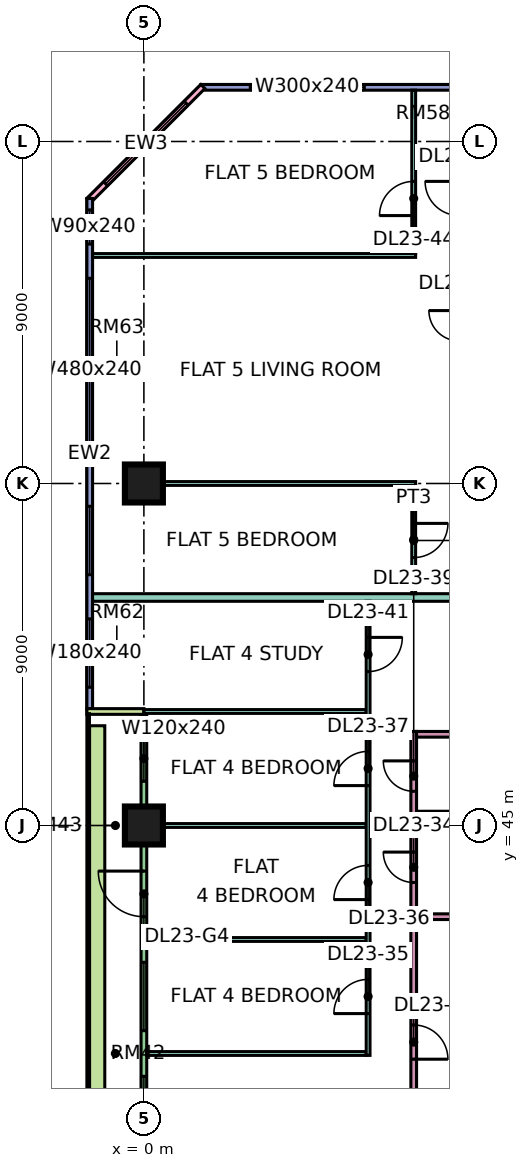
"""IFC4 building model, lengths in metres.
Left out: names, types, materials, properties, quantities, classifications, styles, units other than length and angle.
Written with IfcOpenShell. Run it as: python <this file> out.ifc"""

import sys

from ifc_helpers import new_model, si_unit, direction, frame, frame_2d, origin, origin_2d, place, context, subcontext, project, spatial, rectangle, extrude, element, fill, save


model = new_model("IFC4")
c1 = context("Model", 3, precision=1e-05, world=origin(), true_north=direction((0.0, 1.0)))
c2 = subcontext(c1, "Body", "Model", "MODEL_VIEW")
j1 = project(units=[si_unit("LENGTHUNIT", "METRE"), si_unit("PLANEANGLEUNIT", "RADIAN")], contexts=[c1])
p1 = place(None, origin())
s1 = spatial("IfcSite", under=j1, at=p1, CompositionType="ELEMENT")
p2 = place(p1, origin())
s2 = spatial("IfcBuilding", under=s1, at=p2, CompositionType="ELEMENT")
p3 = place(p2, frame((0.0, 0.0, 103.15)))
s3 = spatial("IfcBuildingStorey", under=s2, at=p3, CompositionType="ELEMENT", Elevation=103.15)
p4 = place(p3, frame((0.0, 45.0, 0.0), z_axis=(0.0, 0.0, 1.0), x_axis=(1.0, 0.0, 0.0)))
e1 = element("IfcColumn", 1, at=p4, inside=s3, PredefinedType="COLUMN", context=c2, shape_type="SweptSolid", body=[
    extrude(rectangle(XDim=1.0, YDim=1.0, at=origin_2d()), origin(), (0.0, 0.0, 1.0), 3.75),
])
p5 = place(p3, frame((0.0, 54.0, 0.0), z_axis=(0.0, 0.0, 1.0), x_axis=(1.0, 0.0, 0.0)))
e2 = element("IfcColumn", 2, at=p5, inside=s3, PredefinedType="COLUMN", context=c2, shape_type="SweptSolid", body=[
    extrude(rectangle(XDim=1.0, YDim=1.0, at=origin_2d()), origin(), (0.0, 0.0, 1.0), 3.75),
])
p6 = place(p3, frame((11.925, 64.425, 0.0), z_axis=(0.0, 0.0, 1.0), x_axis=(-1.0, 0.0, 0.0)))
e3 = element("IfcWall", 3, at=p6, inside=s3, PredefinedType="SOLIDWALL", context=c2, shape_type="SweptSolid", body=[
    extrude(rectangle(XDim=10.425, YDim=0.15, at=frame_2d((5.212, 0.0))), origin(), (0.0, 0.0, 1.0), 3.35),
])
p7 = place(p6, frame((0.613, 0.0, 0.45)))
e4 = element("IfcOpeningElement", 4, at=p7, cuts=e3, PredefinedType="OPENING", context=c2, shape_type="SweptSolid", body=[
    extrude(rectangle(XDim=2.4, YDim=2.4, at=frame_2d((1.2, 1.2))), frame((0.0, 0.085, 0.0), z_axis=(0.0, -1.0, 0.0), x_axis=(1.0, 0.0, 0.0)), (0.0, 0.0, 1.0), 0.17),
])
p8 = place(p6, frame((6.125, 0.0, 0.45)))
e5 = element("IfcOpeningElement", 5, at=p8, cuts=e3, PredefinedType="OPENING", context=c2, shape_type="SweptSolid", body=[
    extrude(rectangle(XDim=3.0, YDim=2.4, at=frame_2d((1.5, 1.2))), frame((0.0, 0.085, 0.0), z_axis=(0.0, -1.0, 0.0), x_axis=(1.0, 0.0, 0.0)), (0.0, 0.0, 1.0), 0.17),
])
p9 = place(p3, frame((1.553, 64.447, 0.0), z_axis=(0.0, 0.0, 1.0), x_axis=(-0.707106781187, -0.707106781187, 0.0)))
e6 = element("IfcWall", 6, at=p9, inside=s3, PredefinedType="SOLIDWALL", context=c2, shape_type="SweptSolid", body=[
    extrude(rectangle(XDim=4.243, YDim=0.15, at=frame_2d((2.121, 0.0))), origin(), (0.0, 0.0, 1.0), 3.35),
])
p10 = place(p9, frame((0.621, 0.0, 0.45)))
e7 = element("IfcOpeningElement", 7, at=p10, cuts=e6, PredefinedType="OPENING", context=c2, shape_type="SweptSolid", body=[
    extrude(rectangle(XDim=3.0, YDim=2.4, at=frame_2d((1.5, 1.2))), frame((0.0, 0.085, 0.0), z_axis=(0.0, -1.0, 0.0), x_axis=(1.0, 0.0, 0.0)), (0.0, 0.0, 1.0), 0.17),
])
p11 = place(p3, frame((-1.425, 61.5, 0.0), z_axis=(0.0, 0.0, 1.0), x_axis=(0.0, -1.0, 0.0)))
e8 = element("IfcWall", 8, at=p11, inside=s3, PredefinedType="SOLIDWALL", context=c2, shape_type="SweptSolid", body=[
    extrude(rectangle(XDim=13.425, YDim=0.15, at=frame_2d((6.712, 0.0))), origin(), (0.0, 0.0, 1.0), 3.35),
])
p12 = place(p11, frame((0.3, 0.0, 0.45)))
e9 = element("IfcOpeningElement", 9, at=p12, cuts=e8, PredefinedType="OPENING", context=c2, shape_type="SweptSolid", body=[
    extrude(rectangle(XDim=0.9, YDim=2.4, at=frame_2d((0.45, 1.2))), frame((0.0, 0.085, 0.0), z_axis=(0.0, -1.0, 0.0), x_axis=(1.0, 0.0, 0.0)), (0.0, 0.0, 1.0), 0.17),
])
p13 = place(p11, frame((2.1, 0.0, 0.45)))
e10 = element("IfcOpeningElement", 10, at=p13, cuts=e8, PredefinedType="OPENING", context=c2, shape_type="SweptSolid", body=[
    extrude(rectangle(XDim=4.8, YDim=2.4, at=frame_2d((2.4, 1.2))), frame((0.0, 0.085, 0.0), z_axis=(0.0, -1.0, 0.0), x_axis=(1.0, 0.0, 0.0)), (0.0, 0.0, 1.0), 0.17),
])
p14 = place(p11, frame((8.1, 0.0, 0.45)))
e11 = element("IfcOpeningElement", 11, at=p14, cuts=e8, PredefinedType="OPENING", context=c2, shape_type="SweptSolid", body=[
    extrude(rectangle(XDim=1.8, YDim=2.4, at=frame_2d((0.9, 1.2))), frame((0.0, 0.085, 0.0), z_axis=(0.0, -1.0, 0.0), x_axis=(1.0, 0.0, 0.0)), (0.0, 0.0, 1.0), 0.17),
])
p15 = place(p11, frame((11.062, 0.0, 0.45)))
e12 = element("IfcOpeningElement", 12, at=p15, cuts=e8, PredefinedType="OPENING", context=c2, shape_type="SweptSolid", body=[
    extrude(rectangle(XDim=1.8, YDim=2.4, at=frame_2d((0.9, 1.2))), frame((0.0, 0.085, 0.0), z_axis=(0.0, -1.0, 0.0), x_axis=(1.0, 0.0, 0.0)), (0.0, 0.0, 1.0), 0.17),
])
p16 = place(p3, frame((0.0, 47.925, 0.0), z_axis=(0.0, 0.0, 1.0), x_axis=(0.0, -1.0, 0.0)))
e13 = element("IfcWall", 13, at=p16, inside=s3, PredefinedType="SOLIDWALL", context=c2, shape_type="SweptSolid", body=[
    extrude(rectangle(XDim=11.85, YDim=0.15, at=frame_2d((5.925, 0.0))), origin(), (0.0, 0.0, 1.0), 3.35),
])
p17 = place(p16, frame((0.562, 0.0, 0.45)))
e14 = element("IfcOpeningElement", 14, at=p17, cuts=e13, PredefinedType="OPENING", context=c2, shape_type="SweptSolid", body=[
    extrude(rectangle(XDim=1.2, YDim=2.4, at=frame_2d((0.6, 1.2))), frame((0.0, 0.085, 0.0), z_axis=(0.0, -1.0, 0.0), x_axis=(1.0, 0.0, 0.0)), (0.0, 0.0, 1.0), 0.17),
])
p18 = place(p16, frame((4.125, 0.0, 0.0)))
e15 = element("IfcOpeningElement", 15, at=p18, cuts=e13, PredefinedType="OPENING", context=c2, shape_type="SweptSolid", body=[
    extrude(rectangle(XDim=1.2, YDim=2.4, at=frame_2d((0.6, 1.2))), frame((0.0, 0.085, 0.0), z_axis=(0.0, -1.0, 0.0), x_axis=(1.0, 0.0, 0.0)), (0.0, 0.0, 1.0), 0.17),
])
p19 = place(p16, frame((6.525, 0.0, 0.45)))
e16 = element("IfcOpeningElement", 16, at=p19, cuts=e13, PredefinedType="OPENING", context=c2, shape_type="SweptSolid", body=[
    extrude(rectangle(XDim=1.8, YDim=2.4, at=frame_2d((0.9, 1.2))), frame((0.0, 0.085, 0.0), z_axis=(0.0, -1.0, 0.0), x_axis=(1.0, 0.0, 0.0)), (0.0, 0.0, 1.0), 0.17),
])
p20 = place(p16, frame((9.525, 0.0, 0.45)))
e17 = element("IfcOpeningElement", 17, at=p20, cuts=e13, PredefinedType="OPENING", context=c2, shape_type="SweptSolid", body=[
    extrude(rectangle(XDim=1.2, YDim=2.4, at=frame_2d((0.6, 1.2))), frame((0.0, 0.085, 0.0), z_axis=(0.0, -1.0, 0.0), x_axis=(1.0, 0.0, 0.0)), (0.0, 0.0, 1.0), 0.17),
])
p21 = place(p3, frame((-1.5, 48.0, 0.0), z_axis=(0.0, 0.0, 1.0), x_axis=(1.0, 0.0, 0.0)))
e18 = element("IfcWall", 18, at=p21, inside=s3, PredefinedType="SOLIDWALL", context=c2, shape_type="SweptSolid", body=[
    extrude(rectangle(XDim=1.5, YDim=0.15, at=frame_2d((0.75, 0.0))), origin(), (0.0, 0.0, 1.0), 3.35),
])
p22 = place(p3, frame((-1.229, 47.625, 0.0), z_axis=(0.0, 0.0, 1.0), x_axis=(0.0, -1.0, 0.0)))
e19 = element("IfcWall", 19, at=p22, inside=s3, PredefinedType="SOLIDWALL", context=c2, shape_type="SweptSolid", body=[
    extrude(rectangle(XDim=11.25, YDim=0.4, at=frame_2d((5.625, 0.0))), origin(), (0.0, 0.0, 1.0), 0.7),
])
p23 = place(p3, frame((0.0, 48.0, 0.0), z_axis=(0.0, 0.0, 1.0), x_axis=(1.0, 0.0, 0.0)))
e20 = element("IfcWall", 20, at=p23, inside=s3, PredefinedType="PARTITIONING", context=c2, shape_type="SweptSolid", body=[
    extrude(rectangle(XDim=5.85, YDim=0.1, at=frame_2d((2.925, 0.0))), origin(), (0.0, 0.0, 1.0), 3.35),
])
p24 = place(p3, frame((-1.35, 51.0, 0.0), z_axis=(0.0, 0.0, 1.0), x_axis=(1.0, 0.0, 0.0)))
e21 = element("IfcWall", 21, at=p24, inside=s3, PredefinedType="PARTITIONING", context=c2, shape_type="SweptSolid", body=[
    extrude(rectangle(XDim=13.75, YDim=0.2, at=frame_2d((6.875, 0.0))), origin(), (0.0, 0.0, 1.0), 3.35),
])
e22 = element("IfcWall", 22, at=p5, inside=s3, PredefinedType="PARTITIONING", context=c2, shape_type="SweptSolid", body=[
    extrude(rectangle(XDim=7.15, YDim=0.1, at=frame_2d((3.575, 0.0))), origin(), (0.0, 0.0, 1.0), 3.35),
])
p25 = place(p3, frame((-1.35, 60.0, 0.0), z_axis=(0.0, 0.0, 1.0), x_axis=(1.0, 0.0, 0.0)))
e23 = element("IfcWall", 23, at=p25, inside=s3, PredefinedType="PARTITIONING", context=c2, shape_type="SweptSolid", body=[
    extrude(rectangle(XDim=8.5, YDim=0.1, at=frame_2d((4.25, 0.0))), origin(), (0.0, 0.0, 1.0), 3.35),
])
for number, where, z_axis, x_axis in (
    (24, (0.074, 39.0, 0.0), (0.0, 0.0, 1.0), (1.0, 0.0, 0.0)),
    (25, (0.074, 42.0, 0.0), (0.0, 0.0, 1.0), (1.0, 0.0, 0.0)),
    (26, (0.074, 45.0, 0.0), (0.0, 0.0, 1.0), (1.0, 0.0, 0.0)),
):
    element("IfcWall", number, at=place(p3, frame(where, z_axis=z_axis, x_axis=x_axis)), inside=s3, PredefinedType="PARTITIONING", context=c2, shape_type="SweptSolid", body=[
        extrude(rectangle(XDim=5.776, YDim=0.1, at=frame_2d((2.888, 0.0))), origin(), (0.0, 0.0, 1.0), 3.35),
    ])
p26 = place(p3, frame((5.9, 38.95, 0.0), z_axis=(0.0, 0.0, 1.0), x_axis=(0.0, 1.0, 0.0)))
e27 = element("IfcWall", 27, at=p26, inside=s3, PredefinedType="PARTITIONING", context=c2, shape_type="SweptSolid", body=[
    extrude(rectangle(XDim=11.95, YDim=0.1, at=frame_2d((5.975, 0.0))), origin(), (0.0, 0.0, 1.0), 3.35),
])
p27 = place(p26, frame((1.1, 0.0, 0.0)))
e28 = element("IfcOpeningElement", 28, at=p27, cuts=e27, PredefinedType="OPENING", context=c2, shape_type="SweptSolid", body=[
    extrude(rectangle(XDim=0.9, YDim=2.1, at=frame_2d((0.45, 1.05))), frame((0.0, 0.06, 0.0), z_axis=(0.0, -1.0, 0.0), x_axis=(1.0, 0.0, 0.0)), (0.0, 0.0, 1.0), 0.12),
])
p28 = place(p26, frame((4.1, 0.0, 0.0)))
e29 = element("IfcOpeningElement", 29, at=p28, cuts=e27, PredefinedType="OPENING", context=c2, shape_type="SweptSolid", body=[
    extrude(rectangle(XDim=0.9, YDim=2.1, at=frame_2d((0.45, 1.05))), frame((0.0, 0.06, 0.0), z_axis=(0.0, -1.0, 0.0), x_axis=(1.0, 0.0, 0.0)), (0.0, 0.0, 1.0), 0.12),
])
p29 = place(p26, frame((7.1, 0.0, 0.0)))
e30 = element("IfcOpeningElement", 30, at=p29, cuts=e27, PredefinedType="OPENING", context=c2, shape_type="SweptSolid", body=[
    extrude(rectangle(XDim=0.9, YDim=2.1, at=frame_2d((0.45, 1.05))), frame((0.0, 0.06, 0.0), z_axis=(0.0, -1.0, 0.0), x_axis=(1.0, 0.0, 0.0)), (0.0, 0.0, 1.0), 0.12),
])
p30 = place(p26, frame((10.1, 0.0, 0.0)))
e31 = element("IfcOpeningElement", 31, at=p30, cuts=e27, PredefinedType="OPENING", context=c2, shape_type="SweptSolid", body=[
    extrude(rectangle(XDim=0.9, YDim=2.1, at=frame_2d((0.45, 1.05))), frame((0.0, 0.06, 0.0), z_axis=(0.0, -1.0, 0.0), x_axis=(1.0, 0.0, 0.0)), (0.0, 0.0, 1.0), 0.12),
])
p31 = place(p3, frame((7.1, 36.1, 0.0), z_axis=(0.0, 0.0, 1.0), x_axis=(0.0, 1.0, 0.0)))
e32 = element("IfcWall", 32, at=p31, inside=s3, PredefinedType="PARTITIONING", context=c2, shape_type="SweptSolid", body=[
    extrude(rectangle(XDim=11.375, YDim=0.15, at=frame_2d((5.688, 0.0))), origin(), (0.0, 0.0, 1.0), 3.35),
])
p32 = place(p31, frame((7.4, 0.0, 0.0)))
e33 = element("IfcOpeningElement", 33, at=p32, cuts=e32, PredefinedType="OPENING", context=c2, shape_type="SweptSolid", body=[
    extrude(rectangle(XDim=0.8, YDim=2.1, at=frame_2d((0.4, 1.05))), frame((0.0, 0.085, 0.0), z_axis=(0.0, -1.0, 0.0), x_axis=(1.0, 0.0, 0.0)), (0.0, 0.0, 1.0), 0.17),
])
p33 = place(p31, frame((2.75, 0.0, 0.0)))
e34 = element("IfcOpeningElement", 34, at=p33, cuts=e32, PredefinedType="OPENING", context=c2, shape_type="SweptSolid", body=[
    extrude(rectangle(XDim=0.9, YDim=2.1, at=frame_2d((0.45, 1.05))), frame((0.0, 0.085, 0.0), z_axis=(0.0, -1.0, 0.0), x_axis=(1.0, 0.0, 0.0)), (0.0, 0.0, 1.0), 0.17),
])
p34 = place(p31, frame((9.8, 0.0, 0.0)))
e35 = element("IfcOpeningElement", 35, at=p34, cuts=e32, PredefinedType="OPENING", context=c2, shape_type="SweptSolid", body=[
    extrude(rectangle(XDim=0.8, YDim=2.1, at=frame_2d((0.4, 1.05))), frame((0.0, 0.085, 0.0), z_axis=(0.0, -1.0, 0.0), x_axis=(1.0, 0.0, 0.0)), (0.0, 0.0, 1.0), 0.17),
])
p35 = place(p3, frame((7.1, 51.1, 0.0), z_axis=(0.0, 0.0, 1.0), x_axis=(0.0, 1.0, 0.0)))
e36 = element("IfcWall", 36, at=p35, inside=s3, PredefinedType="PARTITIONING", context=c2, shape_type="SweptSolid", body=[
    extrude(rectangle(XDim=2.85, YDim=0.1, at=frame_2d((1.425, 0.0))), origin(), (0.0, 0.0, 1.0), 3.35),
])
p36 = place(p35, frame((0.95, 0.0, 0.0)))
e37 = element("IfcOpeningElement", 37, at=p36, cuts=e36, PredefinedType="OPENING", context=c2, shape_type="SweptSolid", body=[
    extrude(rectangle(XDim=0.9, YDim=2.1, at=frame_2d((0.45, 1.05))), frame((0.0, 0.06, 0.0), z_axis=(0.0, -1.0, 0.0), x_axis=(1.0, 0.0, 0.0)), (0.0, 0.0, 1.0), 0.12),
])
p37 = place(p3, frame((7.1, 60.05, 0.0), z_axis=(0.0, 0.0, 1.0), x_axis=(0.0, 1.0, 0.0)))
e38 = element("IfcWall", 38, at=p37, inside=s3, PredefinedType="PARTITIONING", context=c2, shape_type="SweptSolid", body=[
    extrude(rectangle(XDim=4.3, YDim=0.1, at=frame_2d((2.15, 0.0))), origin(), (0.0, 0.0, 1.0), 3.35),
])
p38 = place(p37, frame((1.0, 0.0, 0.0)))
e39 = element("IfcOpeningElement", 39, at=p38, cuts=e38, PredefinedType="OPENING", context=c2, shape_type="SweptSolid", body=[
    extrude(rectangle(XDim=0.9, YDim=2.1, at=frame_2d((0.45, 1.05))), frame((0.0, 0.06, 0.0), z_axis=(0.0, -1.0, 0.0), x_axis=(1.0, 0.0, 0.0)), (0.0, 0.0, 1.0), 0.12),
])
for number, where, z_axis, x_axis in (
    (40, (7.175, 42.6, 0.0), (0.0, 0.0, 1.0), (1.0, 0.0, 0.0)),
    (41, (7.175, 45.3, 0.0), (0.0, 0.0, 1.0), (1.0, 0.0, 0.0)),
    (42, (7.175, 47.4, 0.0), (0.0, 0.0, 1.0), (1.0, 0.0, 0.0)),
):
    element("IfcWall", number, at=place(p3, frame(where, z_axis=z_axis, x_axis=x_axis)), inside=s3, PredefinedType="PARTITIONING", context=c2, shape_type="SweptSolid", body=[
        extrude(rectangle(XDim=5.225, YDim=0.15, at=frame_2d((2.612, 0.0))), origin(), (0.0, 0.0, 1.0), 3.35),
    ])
p39 = place(p8, origin())
e43 = element("IfcWindow", 43, at=p39, inside=s3, PartitioningType="SINGLE_PANEL", PredefinedType="WINDOW", context=c2, shape_type="SweptSolid", body=[
    extrude(rectangle(XDim=3.0, YDim=2.4, at=frame_2d((1.5, 1.2))), frame((0.0, 0.03, 0.0), z_axis=(0.0, -1.0, 0.0), x_axis=(1.0, 0.0, 0.0)), (0.0, 0.0, 1.0), 0.06),
])
fill(e5, e43)
p40 = place(p10, origin())
e44 = element("IfcWindow", 44, at=p40, inside=s3, PartitioningType="SINGLE_PANEL", PredefinedType="WINDOW", context=c2, shape_type="SweptSolid", body=[
    extrude(rectangle(XDim=3.0, YDim=2.4, at=frame_2d((1.5, 1.2))), frame((0.0, 0.03, 0.0), z_axis=(0.0, -1.0, 0.0), x_axis=(1.0, 0.0, 0.0)), (0.0, 0.0, 1.0), 0.06),
])
fill(e7, e44)
p41 = place(p12, origin())
e45 = element("IfcWindow", 45, at=p41, inside=s3, PartitioningType="SINGLE_PANEL", PredefinedType="WINDOW", context=c2, shape_type="SweptSolid", body=[
    extrude(rectangle(XDim=0.9, YDim=2.4, at=frame_2d((0.45, 1.2))), frame((0.0, 0.03, 0.0), z_axis=(0.0, -1.0, 0.0), x_axis=(1.0, 0.0, 0.0)), (0.0, 0.0, 1.0), 0.06),
])
fill(e9, e45)
p42 = place(p13, origin())
e46 = element("IfcWindow", 46, at=p42, inside=s3, PartitioningType="SINGLE_PANEL", PredefinedType="WINDOW", context=c2, shape_type="SweptSolid", body=[
    extrude(rectangle(XDim=4.8, YDim=2.4, at=frame_2d((2.4, 1.2))), frame((0.0, 0.03, 0.0), z_axis=(0.0, -1.0, 0.0), x_axis=(1.0, 0.0, 0.0)), (0.0, 0.0, 1.0), 0.06),
])
fill(e10, e46)
p43 = place(p14, origin())
e47 = element("IfcWindow", 47, at=p43, inside=s3, PartitioningType="SINGLE_PANEL", PredefinedType="WINDOW", context=c2, shape_type="SweptSolid", body=[
    extrude(rectangle(XDim=1.8, YDim=2.4, at=frame_2d((0.9, 1.2))), frame((0.0, 0.03, 0.0), z_axis=(0.0, -1.0, 0.0), x_axis=(1.0, 0.0, 0.0)), (0.0, 0.0, 1.0), 0.06),
])
fill(e11, e47)
p44 = place(p15, origin())
e48 = element("IfcWindow", 48, at=p44, inside=s3, PartitioningType="SINGLE_PANEL", PredefinedType="WINDOW", context=c2, shape_type="SweptSolid", body=[
    extrude(rectangle(XDim=1.8, YDim=2.4, at=frame_2d((0.9, 1.2))), frame((0.0, 0.03, 0.0), z_axis=(0.0, -1.0, 0.0), x_axis=(1.0, 0.0, 0.0)), (0.0, 0.0, 1.0), 0.06),
])
fill(e12, e48)
p45 = place(p17, origin())
e49 = element("IfcWindow", 49, at=p45, inside=s3, PartitioningType="SINGLE_PANEL", PredefinedType="WINDOW", context=c2, shape_type="SweptSolid", body=[
    extrude(rectangle(XDim=1.2, YDim=2.4, at=frame_2d((0.6, 1.2))), frame((0.0, 0.03, 0.0), z_axis=(0.0, -1.0, 0.0), x_axis=(1.0, 0.0, 0.0)), (0.0, 0.0, 1.0), 0.06),
])
fill(e14, e49)
p46 = place(p18, frame((1.2, 0.0, 0.0), z_axis=(0.0, 0.0, 1.0), x_axis=(-1.0, 0.0, 0.0)))
e50 = element("IfcDoor", 50, at=p46, inside=s3, OperationType="DOUBLE_DOOR_SINGLE_SWING", PredefinedType="DOOR", context=c2, shape_type="SweptSolid", body=[
    extrude(rectangle(XDim=1.2, YDim=2.4, at=frame_2d((0.6, 1.2))), frame((0.0, 0.025, 0.0), z_axis=(0.0, -1.0, 0.0), x_axis=(1.0, 0.0, 0.0)), (0.0, 0.0, 1.0), 0.05),
])
fill(e15, e50)
p47 = place(p19, origin())
e51 = element("IfcWindow", 51, at=p47, inside=s3, PartitioningType="SINGLE_PANEL", PredefinedType="WINDOW", context=c2, shape_type="SweptSolid", body=[
    extrude(rectangle(XDim=1.8, YDim=2.4, at=frame_2d((0.9, 1.2))), frame((0.0, 0.03, 0.0), z_axis=(0.0, -1.0, 0.0), x_axis=(1.0, 0.0, 0.0)), (0.0, 0.0, 1.0), 0.06),
])
fill(e16, e51)
p48 = place(p20, origin())
e52 = element("IfcWindow", 52, at=p48, inside=s3, PartitioningType="SINGLE_PANEL", PredefinedType="WINDOW", context=c2, shape_type="SweptSolid", body=[
    extrude(rectangle(XDim=1.2, YDim=2.4, at=frame_2d((0.6, 1.2))), frame((0.0, 0.03, 0.0), z_axis=(0.0, -1.0, 0.0), x_axis=(1.0, 0.0, 0.0)), (0.0, 0.0, 1.0), 0.06),
])
fill(e17, e52)
p49 = place(p32, frame((0.8, 0.0, 0.0), z_axis=(0.0, 0.0, 1.0), x_axis=(-1.0, 0.0, 0.0)))
e53 = element("IfcDoor", 53, at=p49, inside=s3, OperationType="SINGLE_SWING_RIGHT", PredefinedType="DOOR", context=c2, shape_type="SweptSolid", body=[
    extrude(rectangle(XDim=0.8, YDim=2.1, at=frame_2d((0.4, 1.05))), frame((0.0, 0.025, 0.0), z_axis=(0.0, -1.0, 0.0), x_axis=(1.0, 0.0, 0.0)), (0.0, 0.0, 1.0), 0.05),
])
fill(e33, e53)
p50 = place(p27, origin())
e54 = element("IfcDoor", 54, at=p50, inside=s3, OperationType="SINGLE_SWING_LEFT", PredefinedType="DOOR", context=c2, shape_type="SweptSolid", body=[
    extrude(rectangle(XDim=0.9, YDim=2.1, at=frame_2d((0.45, 1.05))), frame((0.0, 0.025, 0.0), z_axis=(0.0, -1.0, 0.0), x_axis=(1.0, 0.0, 0.0)), (0.0, 0.0, 1.0), 0.05),
])
fill(e28, e54)
p51 = place(p28, origin())
e55 = element("IfcDoor", 55, at=p51, inside=s3, OperationType="SINGLE_SWING_LEFT", PredefinedType="DOOR", context=c2, shape_type="SweptSolid", body=[
    extrude(rectangle(XDim=0.9, YDim=2.1, at=frame_2d((0.45, 1.05))), frame((0.0, 0.025, 0.0), z_axis=(0.0, -1.0, 0.0), x_axis=(1.0, 0.0, 0.0)), (0.0, 0.0, 1.0), 0.05),
])
fill(e29, e55)
p52 = place(p29, origin())
e56 = element("IfcDoor", 56, at=p52, inside=s3, OperationType="SINGLE_SWING_LEFT", PredefinedType="DOOR", context=c2, shape_type="SweptSolid", body=[
    extrude(rectangle(XDim=0.9, YDim=2.1, at=frame_2d((0.45, 1.05))), frame((0.0, 0.025, 0.0), z_axis=(0.0, -1.0, 0.0), x_axis=(1.0, 0.0, 0.0)), (0.0, 0.0, 1.0), 0.05),
])
fill(e30, e56)
p53 = place(p33, frame((0.9, 0.0, 0.0), z_axis=(0.0, 0.0, 1.0), x_axis=(-1.0, 0.0, 0.0)))
e57 = element("IfcDoor", 57, at=p53, inside=s3, OperationType="SINGLE_SWING_LEFT", PredefinedType="DOOR", context=c2, shape_type="SweptSolid", body=[
    extrude(rectangle(XDim=0.9, YDim=2.1, at=frame_2d((0.45, 1.05))), frame((0.0, 0.025, 0.0), z_axis=(0.0, -1.0, 0.0), x_axis=(1.0, 0.0, 0.0)), (0.0, 0.0, 1.0), 0.05),
])
fill(e34, e57)
p54 = place(p34, frame((0.8, 0.0, 0.0), z_axis=(0.0, 0.0, 1.0), x_axis=(-1.0, 0.0, 0.0)))
e58 = element("IfcDoor", 58, at=p54, inside=s3, OperationType="SINGLE_SWING_RIGHT", PredefinedType="DOOR", context=c2, shape_type="SweptSolid", body=[
    extrude(rectangle(XDim=0.8, YDim=2.1, at=frame_2d((0.4, 1.05))), frame((0.0, 0.025, 0.0), z_axis=(0.0, -1.0, 0.0), x_axis=(1.0, 0.0, 0.0)), (0.0, 0.0, 1.0), 0.05),
])
fill(e35, e58)
p55 = place(p30, origin())
e59 = element("IfcDoor", 59, at=p55, inside=s3, OperationType="SINGLE_SWING_RIGHT", PredefinedType="DOOR", context=c2, shape_type="SweptSolid", body=[
    extrude(rectangle(XDim=0.9, YDim=2.1, at=frame_2d((0.45, 1.05))), frame((0.0, 0.025, 0.0), z_axis=(0.0, -1.0, 0.0), x_axis=(1.0, 0.0, 0.0)), (0.0, 0.0, 1.0), 0.05),
])
fill(e31, e59)
p56 = place(p36, origin())
e60 = element("IfcDoor", 60, at=p56, inside=s3, OperationType="SINGLE_SWING_RIGHT", PredefinedType="DOOR", context=c2, shape_type="SweptSolid", body=[
    extrude(rectangle(XDim=0.9, YDim=2.1, at=frame_2d((0.45, 1.05))), frame((0.0, 0.025, 0.0), z_axis=(0.0, -1.0, 0.0), x_axis=(1.0, 0.0, 0.0)), (0.0, 0.0, 1.0), 0.05),
])
fill(e37, e60)
p57 = place(p38, origin())
e61 = element("IfcDoor", 61, at=p57, inside=s3, OperationType="SINGLE_SWING_LEFT", PredefinedType="DOOR", context=c2, shape_type="SweptSolid", body=[
    extrude(rectangle(XDim=0.9, YDim=2.1, at=frame_2d((0.45, 1.05))), frame((0.0, 0.025, 0.0), z_axis=(0.0, -1.0, 0.0), x_axis=(1.0, 0.0, 0.0)), (0.0, 0.0, 1.0), 0.05),
])
fill(e39, e61)
save(model, sys.argv[1])
